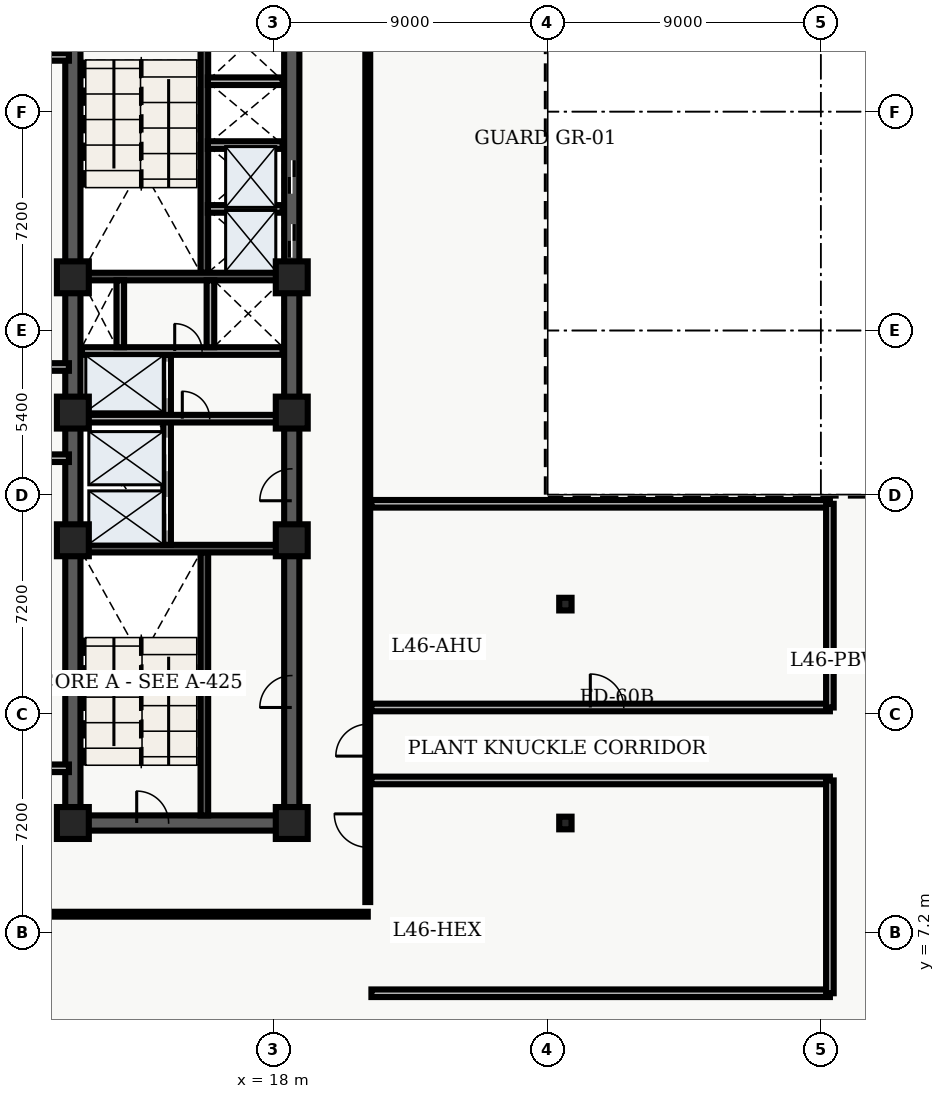
"""IFC4 building model, lengths in metres.
Left out: names, types, materials, properties, quantities, classifications, styles, units other than length and angle.
Written with IfcOpenShell. Run it as: python <this file> out.ifc"""

import sys

from ifc_helpers import new_model, entity, si_unit, converted_unit, direction, frame, origin_with_axes, origin_2d_with_axis, place, context, subcontext, project, spatial, polyline, rectangle, i_section, outline, extrude, element, fill, save


model = new_model("IFC4")
c1 = context("Model", 3, precision=1e-05, world=origin_with_axes(), true_north=direction((0.0, 1.0)))
c2 = subcontext(c1, "Body", "Model", "MODEL_VIEW")
j1 = project(units=[si_unit("LENGTHUNIT", "METRE"), converted_unit("PLANEANGLEUNIT", "DEGREE", entity("IfcPlaneAngleMeasure", 0.017), si_unit("PLANEANGLEUNIT", "RADIAN"), dimensions=[0, 0, 0, 0, 0, 0, 0])], contexts=[c1])
p1 = place(None, origin_with_axes())
s1 = spatial("IfcSite", under=j1, at=p1, CompositionType="ELEMENT")
p2 = place(p1, origin_with_axes())
s2 = spatial("IfcBuilding", under=s1, at=p2, CompositionType="ELEMENT")
p3 = place(p2, frame((0.0, 0.0, 187.5), z_axis=(0.0, 0.0, 1.0), x_axis=(1.0, 0.0, 0.0)))
s3 = spatial("IfcBuildingStorey", under=s2, at=p3, CompositionType="ELEMENT", Elevation=187.5)
p4 = place(p3, frame((11.4, 10.8, 0.0), z_axis=(0.0, 0.0, 1.0), x_axis=(0.0, 1.0, 0.0)))
e1 = element("IfcWall", 1, at=p4, inside=s3, PredefinedType="SHEAR", context=c2, shape_type="SweptSolid", body=[
    extrude(outline(polyline([(0.0, -0.25), (27.0, -0.25), (27.0, 0.25), (0.0, 0.25), (0.0, -0.25)])), origin_with_axes(), (0.0, 0.0, 1.0), 4.86),
])
p5 = place(p3, frame((11.4, 10.8, 0.0), z_axis=(0.0, 0.0, 1.0), x_axis=(1.0, 0.0, 0.0)))
e2 = element("IfcWall", 2, at=p5, inside=s3, PredefinedType="SHEAR", context=c2, shape_type="SweptSolid", body=[
    extrude(outline(polyline([(0.0, -0.25), (7.2, -0.25), (7.2, 0.25), (0.0, 0.25), (0.0, -0.25)])), origin_with_axes(), (0.0, 0.0, 1.0), 4.86),
])
p6 = place(p5, frame((2.625, 0.0, 0.0), z_axis=(0.0, 0.0, 1.0), x_axis=(1.0, 0.0, 0.0)))
e3 = element("IfcOpeningElement", 3, at=p6, cuts=e2, PredefinedType="OPENING", context=c2, shape_type="SweptSolid", body=[
    extrude(rectangle(XDim=1.05, YDim=0.52, at=origin_2d_with_axis()), origin_with_axes(), (0.0, 0.0, 1.0), 2.15),
])
p7 = place(p3, frame((18.6, 10.8, 0.0), z_axis=(0.0, 0.0, 1.0), x_axis=(0.0, 1.0, 0.0)))
e4 = element("IfcWall", 4, at=p7, inside=s3, PredefinedType="SHEAR", context=c2, shape_type="SweptSolid", body=[
    extrude(outline(polyline([(0.0, -0.25), (13.5, -0.25), (13.5, 0.25), (0.0, 0.25), (0.0, -0.25)])), origin_with_axes(), (0.0, 0.0, 1.0), 4.86),
])
p8 = place(p7, frame((11.125, 0.0, 0.0), z_axis=(0.0, 0.0, 1.0), x_axis=(1.0, 0.0, 0.0)))
e5 = element("IfcOpeningElement", 5, at=p8, cuts=e4, PredefinedType="OPENING", context=c2, shape_type="SweptSolid", body=[
    extrude(rectangle(XDim=1.05, YDim=0.52, at=origin_2d_with_axis()), origin_with_axes(), (0.0, 0.0, 1.0), 2.15),
])
p9 = place(p7, frame((4.325, 0.0, 0.0), z_axis=(0.0, 0.0, 1.0), x_axis=(1.0, 0.0, 0.0)))
e6 = element("IfcOpeningElement", 6, at=p9, cuts=e4, PredefinedType="OPENING", context=c2, shape_type="SweptSolid", body=[
    extrude(rectangle(XDim=1.05, YDim=0.52, at=origin_2d_with_axis()), origin_with_axes(), (0.0, 0.0, 1.0), 2.15),
])
p10 = place(p3, frame((18.6, 24.3, 0.0), z_axis=(0.0, 0.0, 1.0), x_axis=(0.0, 1.0, 0.0)))
e7 = element("IfcWall", 7, at=p10, inside=s3, PredefinedType="SHEAR", context=c2, shape_type="SweptSolid", body=[
    extrude(outline(polyline([(0.0, -0.25), (13.5, -0.25), (13.5, 0.25), (0.0, 0.25), (0.0, -0.25)])), origin_with_axes(), (0.0, 0.0, 1.0), 4.86),
])
p11 = place(p10, frame((5.65, 0.0, 0.0), z_axis=(0.0, 0.0, 1.0), x_axis=(1.0, 0.0, 0.0)))
e8 = element("IfcOpeningElement", 8, at=p11, cuts=e7, PredefinedType="OPENING", context=c2, shape_type="SweptSolid", body=[
    extrude(rectangle(XDim=1.1, YDim=0.52, at=origin_2d_with_axis()), origin_with_axes(), (0.0, 0.0, 1.0), 2.15),
])
p12 = place(p10, frame((7.75, 0.0, 0.0), z_axis=(0.0, 0.0, 1.0), x_axis=(1.0, 0.0, 0.0)))
e9 = element("IfcOpeningElement", 9, at=p12, cuts=e7, PredefinedType="OPENING", context=c2, shape_type="SweptSolid", body=[
    extrude(rectangle(XDim=1.1, YDim=0.52, at=origin_2d_with_axis()), origin_with_axes(), (0.0, 0.0, 1.0), 2.15),
])
p13 = place(p3, frame((15.725, 11.05, 0.0), z_axis=(0.0, 0.0, 1.0), x_axis=(0.0, 1.0, 0.0)))
e10 = element("IfcWall", 10, at=p13, inside=s3, PredefinedType="SHEAR", context=c2, shape_type="SweptSolid", body=[
    extrude(outline(polyline([(0.0, -0.125), (8.65, -0.125), (8.65, 0.125), (0.0, 0.125), (0.0, -0.125)])), origin_with_axes(), (0.0, 0.0, 1.0), 4.86),
])
p14 = place(p3, frame((11.65, 19.825, 0.0), z_axis=(0.0, 0.0, 1.0), x_axis=(1.0, 0.0, 0.0)))
e11 = element("IfcWall", 11, at=p14, inside=s3, PredefinedType="SHEAR", context=c2, shape_type="SweptSolid", body=[
    extrude(outline(polyline([(0.0, -0.125), (6.7, -0.125), (6.7, 0.125), (0.0, 0.125), (0.0, -0.125)])), origin_with_axes(), (0.0, 0.0, 1.0), 4.86),
])
p15 = place(p3, frame((15.725, 28.9, 0.0), z_axis=(0.0, 0.0, 1.0), x_axis=(0.0, 1.0, 0.0)))
e12 = element("IfcWall", 12, at=p15, inside=s3, PredefinedType="SHEAR", context=c2, shape_type="SweptSolid", body=[
    extrude(outline(polyline([(0.0, -0.125), (8.65, -0.125), (8.65, 0.125), (0.0, 0.125), (0.0, -0.125)])), origin_with_axes(), (0.0, 0.0, 1.0), 4.86),
])
p16 = place(p3, frame((11.65, 28.775, 0.0), z_axis=(0.0, 0.0, 1.0), x_axis=(1.0, 0.0, 0.0)))
e13 = element("IfcWall", 13, at=p16, inside=s3, PredefinedType="SHEAR", context=c2, shape_type="SweptSolid", body=[
    extrude(outline(polyline([(0.0, -0.125), (6.7, -0.125), (6.7, 0.125), (0.0, 0.125), (0.0, -0.125)])), origin_with_axes(), (0.0, 0.0, 1.0), 4.86),
])
p17 = place(p3, frame((14.5, 19.95, 0.0), z_axis=(0.0, 0.0, 1.0), x_axis=(0.0, 1.0, 0.0)))
e14 = element("IfcWall", 14, at=p17, inside=s3, PredefinedType="SOLIDWALL", context=c2, shape_type="SweptSolid", body=[
    extrude(outline(polyline([(0.0, -0.125), (6.25, -0.125), (6.25, 0.125), (0.0, 0.125), (0.0, -0.125)])), origin_with_axes(), (0.0, 0.0, 1.0), 3.6),
])
p18 = place(p17, frame((1.025, 0.0, 0.0), z_axis=(0.0, 0.0, 1.0), x_axis=(1.0, 0.0, 0.0)))
e15 = element("IfcOpeningElement", 15, at=p18, cuts=e14, PredefinedType="OPENING", context=c2, shape_type="SweptSolid", body=[
    extrude(rectangle(XDim=1.1, YDim=0.27, at=origin_2d_with_axis()), origin_with_axes(), (0.0, 0.0, 1.0), 2.15),
])
p19 = place(p17, frame((2.975, 0.0, 0.0), z_axis=(0.0, 0.0, 1.0), x_axis=(1.0, 0.0, 0.0)))
e16 = element("IfcOpeningElement", 16, at=p19, cuts=e14, PredefinedType="OPENING", context=c2, shape_type="SweptSolid", body=[
    extrude(rectangle(XDim=1.1, YDim=0.27, at=origin_2d_with_axis()), origin_with_axes(), (0.0, 0.0, 1.0), 2.15),
])
p20 = place(p17, frame((5.425, 0.0, 0.0), z_axis=(0.0, 0.0, 1.0), x_axis=(1.0, 0.0, 0.0)))
e17 = element("IfcOpeningElement", 17, at=p20, cuts=e14, PredefinedType="OPENING", context=c2, shape_type="SweptSolid", body=[
    extrude(rectangle(XDim=1.2, YDim=0.27, at=origin_2d_with_axis()), origin_with_axes(), (0.0, 0.0, 1.0), 2.15),
])
p21 = place(p3, frame((11.7, 24.1, 0.0), z_axis=(0.0, 0.0, 1.0), x_axis=(1.0, 0.0, 0.0)))
e18 = element("IfcWall", 18, at=p21, inside=s3, PredefinedType="SOLIDWALL", context=c2, shape_type="SweptSolid", body=[
    extrude(outline(polyline([(0.0, -0.125), (6.6, -0.125), (6.6, 0.125), (0.0, 0.125), (0.0, -0.125)])), origin_with_axes(), (0.0, 0.0, 1.0), 3.6),
])
p22 = place(p21, frame((3.75, 0.0, 0.0), z_axis=(0.0, 0.0, 1.0), x_axis=(1.0, 0.0, 0.0)))
e19 = element("IfcOpeningElement", 19, at=p22, cuts=e18, PredefinedType="OPENING", context=c2, shape_type="SweptSolid", body=[
    extrude(rectangle(XDim=0.9, YDim=0.27, at=origin_2d_with_axis()), origin_with_axes(), (0.0, 0.0, 1.0), 2.15),
])
p23 = place(p3, frame((11.7, 26.325, 0.0), z_axis=(0.0, 0.0, 1.0), x_axis=(1.0, 0.0, 0.0)))
e20 = element("IfcWall", 20, at=p23, inside=s3, PredefinedType="SOLIDWALL", context=c2, shape_type="SweptSolid", body=[
    extrude(outline(polyline([(0.0, -0.125), (6.6, -0.125), (6.6, 0.125), (0.0, 0.125), (0.0, -0.125)])), origin_with_axes(), (0.0, 0.0, 1.0), 3.6),
])
p24 = place(p23, frame((3.5, 0.0, 0.0), z_axis=(0.0, 0.0, 1.0), x_axis=(1.0, 0.0, 0.0)))
e21 = element("IfcOpeningElement", 21, at=p24, cuts=e20, PredefinedType="OPENING", context=c2, shape_type="SweptSolid", body=[
    extrude(rectangle(XDim=0.9, YDim=0.27, at=origin_2d_with_axis()), origin_with_axes(), (0.0, 0.0, 1.0), 2.15),
])
for number, where, z_axis, x_axis in (
    (22, (12.96, 26.45, 0.0), (0.0, 0.0, 1.0), (0.0, 1.0, 0.0)),
    (23, (15.925, 26.45, 0.0), (0.0, 0.0, 1.0), (0.0, 1.0, 0.0)),
):
    element("IfcWall", number, at=place(p3, frame(where, z_axis=z_axis, x_axis=x_axis)), inside=s3, PredefinedType="SOLIDWALL", context=c2, shape_type="SweptSolid", body=[
        extrude(outline(polyline([(0.0, -0.125), (2.2, -0.125), (2.2, 0.125), (0.0, 0.125), (0.0, -0.125)])), origin_with_axes(), (0.0, 0.0, 1.0), 3.6),
    ])
for number, where, z_axis, x_axis in (
    (24, (11.4, 10.8, 0.0), (0.0, 0.0, 1.0), (1.0, 0.0, 0.0)),
    (25, (11.4, 20.1, 0.0), (0.0, 0.0, 1.0), (1.0, 0.0, 0.0)),
    (26, (11.4, 24.3, 0.0), (0.0, 0.0, 1.0), (1.0, 0.0, 0.0)),
    (27, (11.4, 28.75, 0.0), (0.0, 0.0, 1.0), (1.0, 0.0, 0.0)),
    (28, (18.6, 10.8, 0.0), (0.0, 0.0, 1.0), (1.0, 0.0, 0.0)),
    (29, (18.6, 20.1, 0.0), (0.0, 0.0, 1.0), (1.0, 0.0, 0.0)),
    (30, (18.6, 24.3, 0.0), (0.0, 0.0, 1.0), (1.0, 0.0, 0.0)),
    (31, (18.6, 28.75, 0.0), (0.0, 0.0, 1.0), (1.0, 0.0, 0.0)),
):
    element("IfcColumn", number, at=place(p3, frame(where, z_axis=z_axis, x_axis=x_axis)), inside=s3, PredefinedType="COLUMN", context=c2, shape_type="SweptSolid", body=[
        extrude(rectangle(XDim=1.05, YDim=1.05, at=origin_2d_with_axis()), origin_with_axes(), (0.0, 0.0, 1.0), 5.1),
    ])
for number, where, z_axis, x_axis in (
    (32, (27.6, 10.8, 0.0), (0.0, 0.0, 1.0), (1.0, 0.0, 0.0)),
    (33, (27.6, 18.0, 0.0), (0.0, 0.0, 1.0), (1.0, 0.0, 0.0)),
):
    element("IfcColumn", number, at=place(p3, frame(where, z_axis=z_axis, x_axis=x_axis)), inside=s3, PredefinedType="COLUMN", context=c2, shape_type="SweptSolid", body=[
        extrude(i_section(OverallWidth=0.406, OverallDepth=0.416, WebThickness=0.03, FlangeThickness=0.048, FilletRadius=0.022, at=origin_2d_with_axis()), origin_with_axes(), (0.0, 0.0, 1.0), 5.1),
    ])
for number, where, z_axis, x_axis in (
    (34, (15.84, 31.0, 0.0), (0.0, 0.0, 1.0), (1.0, 0.0, 0.0)),
    (35, (15.84, 33.1, 0.0), (0.0, 0.0, 1.0), (1.0, 0.0, 0.0)),
    (36, (15.84, 35.2, 0.0), (0.0, 0.0, 1.0), (1.0, 0.0, 0.0)),
):
    element("IfcWall", number, at=place(p3, frame(where, z_axis=z_axis, x_axis=x_axis)), inside=s3, PredefinedType="SOLIDWALL", context=c2, shape_type="SweptSolid", body=[
        extrude(outline(polyline([(0.0, -0.125), (2.46, -0.125), (2.46, 0.125), (0.0, 0.125), (0.0, -0.125)])), origin_with_axes(), (0.0, 0.0, 1.0), 3.2),
    ])
p25 = place(p3, frame((21.1, 8.2, 0.0), z_axis=(0.0, 0.0, 1.0), x_axis=(0.0, 1.0, 0.0)))
e37 = element("IfcWall", 37, at=p25, inside=s3, PredefinedType="PARTITIONING", context=c2, shape_type="SweptSolid", body=[
    extrude(outline(polyline([(0.0, -0.08), (32.0, -0.08), (32.0, 0.08), (0.0, 0.08), (0.0, -0.08)])), origin_with_axes(), (0.0, 0.0, 1.0), 3.2),
])
p26 = place(p25, frame((5.325, 0.0, 0.0), z_axis=(0.0, 0.0, 1.0), x_axis=(1.0, 0.0, 0.0)))
e38 = element("IfcOpeningElement", 38, at=p26, cuts=e37, PredefinedType="OPENING", context=c2, shape_type="SweptSolid", body=[
    extrude(rectangle(XDim=1.05, YDim=0.18, at=origin_2d_with_axis()), origin_with_axes(), (0.0, 0.0, 1.0), 2.15),
])
p27 = place(p25, frame((2.35, 0.0, 0.0), z_axis=(0.0, 0.0, 1.0), x_axis=(1.0, 0.0, 0.0)))
e39 = element("IfcOpeningElement", 39, at=p27, cuts=e37, PredefinedType="OPENING", context=c2, shape_type="SweptSolid", body=[
    extrude(rectangle(XDim=1.1, YDim=0.18, at=origin_2d_with_axis()), origin_with_axes(), (0.0, 0.0, 1.0), 2.15),
])
p28 = place(p3, frame((6.6, 12.6, 0.0), z_axis=(0.0, 0.0, 1.0), x_axis=(1.0, 0.0, 0.0)))
e40 = element("IfcWall", 40, at=p28, inside=s3, PredefinedType="SOLIDWALL", context=c2, shape_type="SweptSolid", body=[
    extrude(outline(polyline([(0.0, -0.125), (4.67, -0.125), (4.67, 0.125), (0.0, 0.125), (0.0, -0.125)])), origin_with_axes(), (0.0, 0.0, 1.0), 3.2),
])
p29 = place(p3, frame((6.6, 22.8, 0.0), z_axis=(0.0, 0.0, 1.0), x_axis=(1.0, 0.0, 0.0)))
e41 = element("IfcWall", 41, at=p29, inside=s3, PredefinedType="SOLIDWALL", context=c2, shape_type="SweptSolid", body=[
    extrude(outline(polyline([(0.0, -0.125), (4.67, -0.125), (4.67, 0.125), (0.0, 0.125), (0.0, -0.125)])), origin_with_axes(), (0.0, 0.0, 1.0), 3.2),
])
p30 = place(p29, frame((2.525, 0.0, 0.0), z_axis=(0.0, 0.0, 1.0), x_axis=(1.0, 0.0, 0.0)))
e42 = element("IfcOpeningElement", 42, at=p30, cuts=e41, PredefinedType="OPENING", context=c2, shape_type="SweptSolid", body=[
    extrude(rectangle(XDim=1.05, YDim=0.27, at=origin_2d_with_axis()), origin_with_axes(), (0.0, 0.0, 1.0), 2.15),
])
p31 = place(p3, frame((4.8, 7.8, 0.0), z_axis=(0.0, 0.0, 1.0), x_axis=(1.0, 0.0, 0.0)))
e43 = element("IfcWall", 43, at=p31, inside=s3, PredefinedType="PARTITIONING", context=c2, shape_type="SweptSolid", body=[
    extrude(outline(polyline([(0.0, -0.08), (16.3, -0.08), (16.3, 0.08), (0.0, 0.08), (0.0, -0.08)])), origin_with_axes(), (0.0, 0.0, 1.0), 3.2),
])
p32 = place(p3, frame((6.6, 25.8, 0.0), z_axis=(0.0, 0.0, 1.0), x_axis=(1.0, 0.0, 0.0)))
e44 = element("IfcWall", 44, at=p32, inside=s3, PredefinedType="SOLIDWALL", context=c2, shape_type="SweptSolid", body=[
    extrude(outline(polyline([(0.0, -0.125), (4.67, -0.125), (4.67, 0.125), (0.0, 0.125), (0.0, -0.125)])), origin_with_axes(), (0.0, 0.0, 1.0), 3.2),
])
p33 = place(p32, frame((2.525, 0.0, 0.0), z_axis=(0.0, 0.0, 1.0), x_axis=(1.0, 0.0, 0.0)))
e45 = element("IfcOpeningElement", 45, at=p33, cuts=e44, PredefinedType="OPENING", context=c2, shape_type="SweptSolid", body=[
    extrude(rectangle(XDim=1.05, YDim=0.27, at=origin_2d_with_axis()), origin_with_axes(), (0.0, 0.0, 1.0), 2.15),
])
p34 = place(p3, frame((6.6, 36.0, 0.0), z_axis=(0.0, 0.0, 1.0), x_axis=(1.0, 0.0, 0.0)))
e46 = element("IfcWall", 46, at=p34, inside=s3, PredefinedType="SOLIDWALL", context=c2, shape_type="SweptSolid", body=[
    extrude(outline(polyline([(0.0, -0.125), (4.67, -0.125), (4.67, 0.125), (0.0, 0.125), (0.0, -0.125)])), origin_with_axes(), (0.0, 0.0, 1.0), 3.2),
])
for number, where, z_axis, x_axis in (
    (47, (21.22, 21.3, 0.0), (0.0, 0.0, 1.0), (1.0, 0.0, 0.0)),
    (48, (21.22, 12.2, 0.0), (0.0, 0.0, 1.0), (1.0, 0.0, 0.0)),
):
    element("IfcWall", number, at=place(p3, frame(where, z_axis=z_axis, x_axis=x_axis)), inside=s3, PredefinedType="SOLIDWALL", context=c2, shape_type="SweptSolid", body=[
        extrude(outline(polyline([(0.0, -0.125), (15.08, -0.125), (15.08, 0.125), (0.0, 0.125), (0.0, -0.125)])), origin_with_axes(), (0.0, 0.0, 1.0), 3.2),
    ])
p35 = place(p3, frame((21.22, 14.6, 0.0), z_axis=(0.0, 0.0, 1.0), x_axis=(1.0, 0.0, 0.0)))
e49 = element("IfcWall", 49, at=p35, inside=s3, PredefinedType="SOLIDWALL", context=c2, shape_type="SweptSolid", body=[
    extrude(outline(polyline([(0.0, -0.125), (15.08, -0.125), (15.08, 0.125), (0.0, 0.125), (0.0, -0.125)])), origin_with_axes(), (0.0, 0.0, 1.0), 3.2),
])
p36 = place(p35, frame((7.75, 0.0, 0.0), z_axis=(0.0, 0.0, 1.0), x_axis=(1.0, 0.0, 0.0)))
e50 = element("IfcOpeningElement", 50, at=p36, cuts=e49, PredefinedType="OPENING", context=c2, shape_type="SweptSolid", body=[
    extrude(rectangle(XDim=1.1, YDim=0.27, at=origin_2d_with_axis()), origin_with_axes(), (0.0, 0.0, 1.0), 2.15),
])
p37 = place(p3, frame((36.3, 14.6, 0.0), z_axis=(0.0, 0.0, 1.0), x_axis=(0.0, 1.0, 0.0)))
e51 = element("IfcWall", 51, at=p37, inside=s3, PredefinedType="SOLIDWALL", context=c2, shape_type="SweptSolid", body=[
    extrude(outline(polyline([(0.0, -0.125), (6.7, -0.125), (6.7, 0.125), (0.0, 0.125), (0.0, -0.125)])), origin_with_axes(), (0.0, 0.0, 1.0), 3.2),
])
p38 = place(p3, frame((21.22, 5.2, 0.0), z_axis=(0.0, 0.0, 1.0), x_axis=(1.0, 0.0, 0.0)))
e52 = element("IfcWall", 52, at=p38, inside=s3, PredefinedType="SOLIDWALL", context=c2, shape_type="SweptSolid", body=[
    extrude(outline(polyline([(0.0, -0.125), (15.08, -0.125), (15.08, 0.125), (0.0, 0.125), (0.0, -0.125)])), origin_with_axes(), (0.0, 0.0, 1.0), 3.2),
])
p39 = place(p3, frame((36.3, 5.2, 0.0), z_axis=(0.0, 0.0, 1.0), x_axis=(0.0, 1.0, 0.0)))
e53 = element("IfcWall", 53, at=p39, inside=s3, PredefinedType="SOLIDWALL", context=c2, shape_type="SweptSolid", body=[
    extrude(outline(polyline([(0.0, -0.125), (7.0, -0.125), (7.0, 0.125), (0.0, 0.125), (0.0, -0.125)])), origin_with_axes(), (0.0, 0.0, 1.0), 3.2),
])
p40 = place(p10, frame((5.65, 0.0, 0.0), z_axis=(0.0, 0.0, 1.0), x_axis=(1.0, 0.0, 0.0)))
e54 = element("IfcDoor", 54, at=p40, inside=s3, OperationType="SLIDING_TO_LEFT", PredefinedType="DOOR", context=c2, shape_type="SweptSolid", body=[
    extrude(rectangle(XDim=1.1, YDim=0.09, at=origin_2d_with_axis()), origin_with_axes(), (0.0, 0.0, 1.0), 2.15),
])
fill(e8, e54)
p41 = place(p10, frame((7.75, 0.0, 0.0), z_axis=(0.0, 0.0, 1.0), x_axis=(1.0, 0.0, 0.0)))
e55 = element("IfcDoor", 55, at=p41, inside=s3, OperationType="SLIDING_TO_RIGHT", PredefinedType="DOOR", context=c2, shape_type="SweptSolid", body=[
    extrude(rectangle(XDim=1.1, YDim=0.09, at=origin_2d_with_axis()), origin_with_axes(), (0.0, 0.0, 1.0), 2.15),
])
fill(e9, e55)
p42 = place(p17, frame((1.025, 0.0, 0.0), z_axis=(0.0, 0.0, 1.0), x_axis=(1.0, 0.0, 0.0)))
e56 = element("IfcDoor", 56, at=p42, inside=s3, OperationType="SLIDING_TO_LEFT", PredefinedType="DOOR", context=c2, shape_type="SweptSolid", body=[
    extrude(rectangle(XDim=1.1, YDim=0.09, at=origin_2d_with_axis()), origin_with_axes(), (0.0, 0.0, 1.0), 2.15),
])
fill(e15, e56)
p43 = place(p17, frame((2.975, 0.0, 0.0), z_axis=(0.0, 0.0, 1.0), x_axis=(1.0, 0.0, 0.0)))
e57 = element("IfcDoor", 57, at=p43, inside=s3, OperationType="SLIDING_TO_RIGHT", PredefinedType="DOOR", context=c2, shape_type="SweptSolid", body=[
    extrude(rectangle(XDim=1.1, YDim=0.09, at=origin_2d_with_axis()), origin_with_axes(), (0.0, 0.0, 1.0), 2.15),
])
fill(e16, e57)
p44 = place(p17, frame((5.425, 0.0, 0.0), z_axis=(0.0, 0.0, 1.0), x_axis=(1.0, 0.0, 0.0)))
e58 = element("IfcDoor", 58, at=p44, inside=s3, OperationType="DOUBLE_DOOR_SLIDING", PredefinedType="DOOR", context=c2, shape_type="SweptSolid", body=[
    extrude(rectangle(XDim=1.2, YDim=0.09, at=origin_2d_with_axis()), origin_with_axes(), (0.0, 0.0, 1.0), 2.15),
])
fill(e17, e58)
p45 = place(p5, frame((2.625, 0.0, 0.0), z_axis=(0.0, 0.0, 1.0), x_axis=(1.0, 0.0, 0.0)))
e59 = element("IfcDoor", 59, at=p45, inside=s3, OperationType="SINGLE_SWING_LEFT", PredefinedType="DOOR", context=c2, shape_type="SweptSolid", body=[
    extrude(rectangle(XDim=1.05, YDim=0.09, at=origin_2d_with_axis()), origin_with_axes(), (0.0, 0.0, 1.0), 2.15),
])
fill(e3, e59)
p46 = place(p7, frame((11.125, 0.0, 0.0), z_axis=(0.0, 0.0, 1.0), x_axis=(1.0, 0.0, 0.0)))
e60 = element("IfcDoor", 60, at=p46, inside=s3, OperationType="SINGLE_SWING_LEFT", PredefinedType="DOOR", context=c2, shape_type="SweptSolid", body=[
    extrude(rectangle(XDim=1.05, YDim=0.09, at=origin_2d_with_axis()), origin_with_axes(), (0.0, 0.0, 1.0), 2.15),
])
fill(e5, e60)
p47 = place(p21, frame((3.75, 0.0, 0.0), z_axis=(0.0, 0.0, 1.0), x_axis=(1.0, 0.0, 0.0)))
e61 = element("IfcDoor", 61, at=p47, inside=s3, OperationType="SINGLE_SWING_LEFT", PredefinedType="DOOR", context=c2, shape_type="SweptSolid", body=[
    extrude(rectangle(XDim=0.9, YDim=0.09, at=origin_2d_with_axis()), origin_with_axes(), (0.0, 0.0, 1.0), 2.15),
])
fill(e19, e61)
p48 = place(p23, frame((3.5, 0.0, 0.0), z_axis=(0.0, 0.0, 1.0), x_axis=(1.0, 0.0, 0.0)))
e62 = element("IfcDoor", 62, at=p48, inside=s3, OperationType="SINGLE_SWING_LEFT", PredefinedType="DOOR", context=c2, shape_type="SweptSolid", body=[
    extrude(rectangle(XDim=0.9, YDim=0.09, at=origin_2d_with_axis()), origin_with_axes(), (0.0, 0.0, 1.0), 2.15),
])
fill(e21, e62)
p49 = place(p7, frame((4.325, 0.0, 0.0), z_axis=(0.0, 0.0, 1.0), x_axis=(1.0, 0.0, 0.0)))
e63 = element("IfcDoor", 63, at=p49, inside=s3, OperationType="SINGLE_SWING_LEFT", PredefinedType="DOOR", context=c2, shape_type="SweptSolid", body=[
    extrude(rectangle(XDim=1.05, YDim=0.09, at=origin_2d_with_axis()), origin_with_axes(), (0.0, 0.0, 1.0), 2.15),
])
fill(e6, e63)
p50 = place(p35, frame((7.75, 0.0, 0.0), z_axis=(0.0, 0.0, 1.0), x_axis=(1.0, 0.0, 0.0)))
e64 = element("IfcDoor", 64, at=p50, inside=s3, OperationType="SINGLE_SWING_LEFT", PredefinedType="DOOR", context=c2, shape_type="SweptSolid", body=[
    extrude(rectangle(XDim=1.1, YDim=0.09, at=origin_2d_with_axis()), origin_with_axes(), (0.0, 0.0, 1.0), 2.15),
])
fill(e50, e64)
p51 = place(p25, frame((5.325, 0.0, 0.0), z_axis=(0.0, 0.0, 1.0), x_axis=(1.0, 0.0, 0.0)))
e65 = element("IfcDoor", 65, at=p51, inside=s3, OperationType="SINGLE_SWING_LEFT", PredefinedType="DOOR", context=c2, shape_type="SweptSolid", body=[
    extrude(rectangle(XDim=1.05, YDim=0.09, at=origin_2d_with_axis()), origin_with_axes(), (0.0, 0.0, 1.0), 2.15),
])
fill(e38, e65)
p52 = place(p25, frame((2.35, 0.0, 0.0), z_axis=(0.0, 0.0, 1.0), x_axis=(1.0, 0.0, 0.0)))
e66 = element("IfcDoor", 66, at=p52, inside=s3, OperationType="SINGLE_SWING_RIGHT", PredefinedType="DOOR", context=c2, shape_type="SweptSolid", body=[
    extrude(rectangle(XDim=1.1, YDim=0.09, at=origin_2d_with_axis()), origin_with_axes(), (0.0, 0.0, 1.0), 2.15),
])
fill(e39, e66)
save(model, sys.argv[1])
